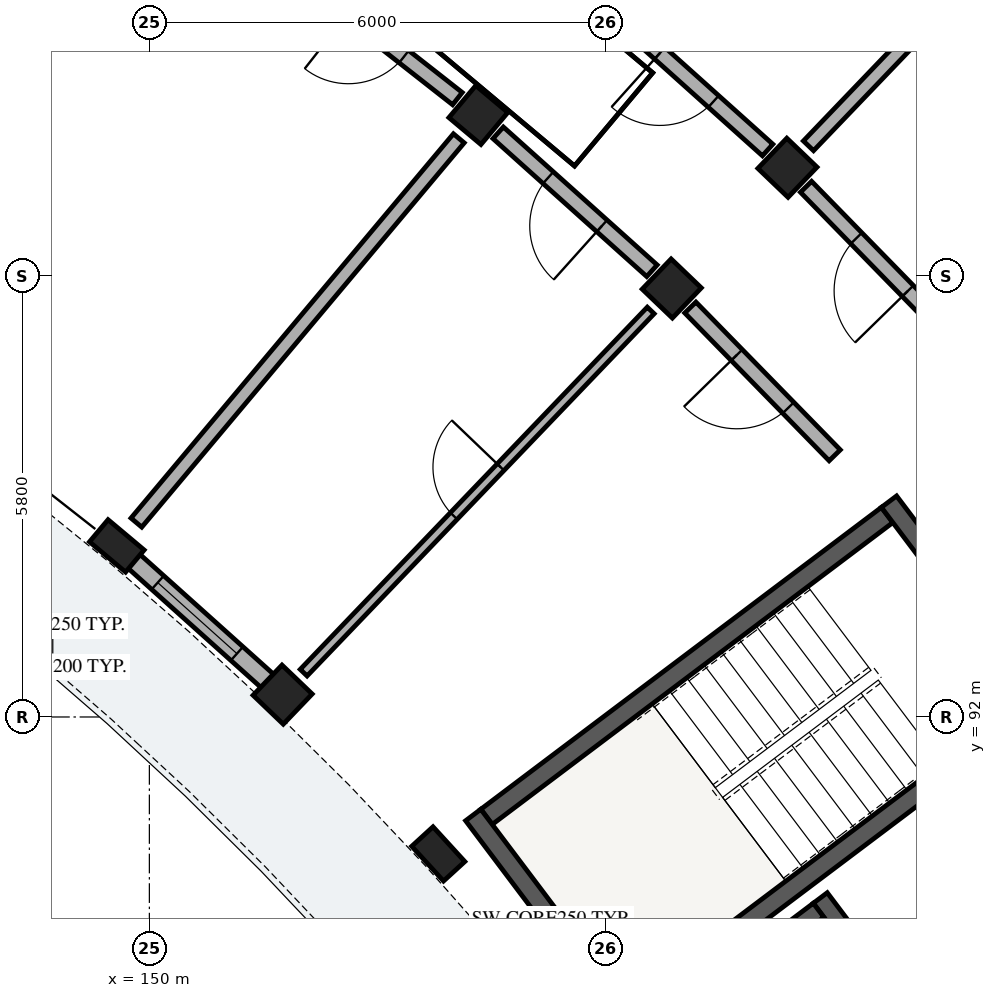
"""IFC4 building model, lengths in metres.
Left out: names, types, materials, properties, quantities, classifications, styles, units other than length and angle.
Written with IfcOpenShell. Run it as: python <this file> out.ifc"""

import sys

from ifc_helpers import new_model, si_unit, direction, frame, frame_2d, origin, origin_2d, place, context, subcontext, project, spatial, rectangle, extrude, element, fill, save


model = new_model("IFC4")
c1 = context("Model", 3, precision=1e-05, world=origin(), true_north=direction((0.0, 1.0)))
c2 = subcontext(c1, "Body", "Model", "MODEL_VIEW")
j1 = project(units=[si_unit("LENGTHUNIT", "METRE"), si_unit("PLANEANGLEUNIT", "RADIAN")], contexts=[c1])
p1 = place(None, origin())
s1 = spatial("IfcSite", under=j1, at=p1, CompositionType="ELEMENT")
p2 = place(p1, origin())
s2 = spatial("IfcBuilding", under=s1, at=p2, CompositionType="ELEMENT")
p3 = place(p2, frame((0.0, 0.0, 18.92)))
s3 = spatial("IfcBuildingStorey", under=s2, at=p3, CompositionType="ELEMENT", Elevation=18.92)
p4 = place(p3, frame((159.707, 94.658, 0.0), z_axis=(0.0, 0.0, 1.0), x_axis=(-0.798639633744, -0.601809550782, 0.0)))
e1 = element("IfcWall", 1, at=p4, inside=s3, PredefinedType="SHEAR", context=c2, shape_type="SweptSolid", body=[
    extrude(rectangle(XDim=6.6, YDim=0.25, at=frame_2d((3.3, 0.0))), origin(), (0.0, 0.0, 1.0), 3.11),
])
p5 = place(p3, frame((154.261, 90.711, 0.0), z_axis=(0.0, 0.0, 1.0), x_axis=(0.601825826579, -0.798627368967, 0.0)))
e2 = element("IfcWall", 2, at=p5, inside=s3, PredefinedType="SHEAR", context=c2, shape_type="SweptSolid", body=[
    extrude(rectangle(XDim=3.42, YDim=0.25, at=frame_2d((1.71, 0.0))), origin(), (0.0, 0.0, 1.0), 3.11),
])
p6 = place(p3, frame((159.731, 94.833, 0.0), z_axis=(0.0, 0.0, 1.0), x_axis=(0.601814606132, -0.798635824294, 0.0)))
e3 = element("IfcWall", 3, at=p6, inside=s3, PredefinedType="SHEAR", context=c2, shape_type="SweptSolid", body=[
    extrude(rectangle(XDim=3.42, YDim=0.25, at=frame_2d((1.71, 0.0))), origin(), (0.0, 0.0, 1.0), 3.11),
])
p7 = place(p3, frame((161.615, 92.126, 0.0), z_axis=(0.0, 0.0, 1.0), x_axis=(-0.798639633744, -0.601809550782, 0.0)))
e4 = element("IfcWall", 4, at=p7, inside=s3, PredefinedType="SHEAR", context=c2, shape_type="SweptSolid", body=[
    extrude(rectangle(XDim=6.6, YDim=0.25, at=frame_2d((3.3, 0.0))), origin(), (0.0, 0.0, 1.0), 3.11),
])
p8 = place(p7, frame((0.22, 0.0, 0.0)))
e5 = element("IfcOpeningElement", 5, at=p8, cuts=e4, PredefinedType="OPENING", context=c2, shape_type="SweptSolid", body=[
    extrude(rectangle(XDim=1.05, YDim=2.15, at=frame_2d((0.525, 1.075))), frame((0.0, 0.135, 0.0), z_axis=(0.0, -1.0, 0.0), x_axis=(1.0, 0.0, 0.0)), (0.0, 0.0, 1.0), 0.27),
])
p9 = place(p3, frame((158.827, 89.619, 0.0), z_axis=(0.0, 0.0, 1.0), x_axis=(0.601819781152, -0.798631924615, 0.0)))
e6 = element("IfcWall", 6, at=p9, inside=s3, PredefinedType="SHEAR", context=c2, shape_type="SweptSolid", body=[
    extrude(rectangle(XDim=3.26, YDim=0.23, at=frame_2d((1.63, 0.0))), origin(), (0.0, 0.0, 1.0), 3.11),
])
p10 = place(p9, frame((0.9, 0.0, 0.0)))
e7 = element("IfcOpeningElement", 7, at=p10, cuts=e6, PredefinedType="OPENING", context=c2, shape_type="SweptSolid", body=[
    extrude(rectangle(XDim=1.1, YDim=2.15, at=frame_2d((0.55, 1.075))), frame((0.0, 0.125, 0.0), z_axis=(0.0, -1.0, 0.0), x_axis=(1.0, 0.0, 0.0)), (0.0, 0.0, 1.0), 0.25),
])
p11 = place(p3, frame((158.805, 89.458, 0.0), z_axis=(0.0, 0.0, 1.0), x_axis=(-0.798608971494, -0.601850239387, 0.0)))
e8 = element("IfcWall", 8, at=p11, inside=s3, PredefinedType="SHEAR", context=c2, shape_type="SweptSolid", body=[
    extrude(rectangle(XDim=2.7, YDim=0.23, at=frame_2d((1.35, 0.0))), origin(), (0.0, 0.0, 1.0), 3.11),
])
p12 = place(p3, frame((153.801, 90.198, 0.0), z_axis=(0.0, 0.0, 1.0), x_axis=(0.73793204255, 0.674875025896, 0.0)))
e9 = element("IfcColumn", 9, at=p12, inside=s3, PredefinedType="PILASTER", context=c2, shape_type="SweptSolid", body=[
    extrude(rectangle(XDim=0.38, YDim=0.62, at=origin_2d()), origin(), (0.0, 0.0, 1.0), 3.11),
])
for number, where, z_axis, x_axis in (
    (10, (151.753, 92.294, 0.0), (0.0, 0.0, 1.0), (0.692, 0.722, 0.0)),
    (11, (156.873, 97.637, 0.0), (0.0, 0.0, 1.0), (0.692, 0.722, 0.0)),
    (12, (158.395, 99.226, 0.0), (0.0, 0.0, 1.0), (0.692, 0.722, 0.0)),
):
    element("IfcColumn", number, at=place(p3, frame(where, z_axis=z_axis, x_axis=x_axis)), inside=s3, PredefinedType="COLUMN", context=c2, shape_type="SweptSolid", body=[
        extrude(rectangle(XDim=0.55, YDim=0.55, at=origin_2d()), origin(), (0.0, 0.0, 1.0), 3.11),
    ])
p13 = place(p3, frame((149.572, 94.251, 0.0), z_axis=(0.0, 0.0, 1.0), x_axis=(0.642787582947, 0.766044465556, 0.0)))
e13 = element("IfcColumn", 13, at=p13, inside=s3, PredefinedType="PILASTER", context=c2, shape_type="SweptSolid", body=[
    extrude(rectangle(XDim=0.38, YDim=0.62, at=origin_2d()), origin(), (0.0, 0.0, 1.0), 3.11),
])
p14 = place(p3, frame((154.329, 99.919, 0.0), z_axis=(0.0, 0.0, 1.0), x_axis=(0.642787582947, 0.766044465556, 0.0)))
e14 = element("IfcColumn", 14, at=p14, inside=s3, PredefinedType="COLUMN", context=c2, shape_type="SweptSolid", body=[
    extrude(rectangle(XDim=0.55, YDim=0.55, at=origin_2d()), origin(), (0.0, 0.0, 1.0), 3.11),
])
p15 = place(p3, frame((151.571, 92.458, 0.0), z_axis=(0.0, 0.0, 1.0), x_axis=(-0.744489903584, 0.667633719536, 0.0)))
e15 = element("IfcWall", 15, at=p15, inside=s3, PredefinedType="SOLIDWALL", context=c2, shape_type="SweptSolid", body=[
    extrude(rectangle(XDim=2.525, YDim=0.24, at=frame_2d((1.263, 0.0))), origin(), (0.0, 0.0, 1.0), 2.355),
])
p16 = place(p15, frame((0.562, 0.0, 0.35)))
e16 = element("IfcOpeningElement", 16, at=p16, cuts=e15, PredefinedType="OPENING", context=c2, shape_type="SweptSolid", body=[
    extrude(rectangle(XDim=1.4, YDim=1.65, at=frame_2d((0.7, 0.825))), frame((0.0, 0.13, 0.0), z_axis=(0.0, -1.0, 0.0), x_axis=(1.0, 0.0, 0.0)), (0.0, 0.0, 1.0), 0.26),
])
p17 = place(p3, frame((160.641, 96.927, 0.0), z_axis=(0.0, 0.0, 1.0), x_axis=(-0.698787219683, 0.715329589496, 0.0)))
e17 = element("IfcWall", 17, at=p17, inside=s3, PredefinedType="PARTITIONING", context=c2, shape_type="SweptSolid", body=[
    extrude(rectangle(XDim=2.863, YDim=0.205, at=frame_2d((1.432, 0.0))), origin(), (0.0, 0.0, 1.0), 2.37),
])
p18 = place(p17, frame((0.947, 0.0, 0.0)))
e18 = element("IfcOpeningElement", 18, at=p18, cuts=e17, PredefinedType="OPENING", context=c2, shape_type="SweptSolid", body=[
    extrude(rectangle(XDim=0.97, YDim=2.15, at=frame_2d((0.485, 1.075))), frame((0.0, 0.113, 0.0), z_axis=(0.0, -1.0, 0.0), x_axis=(1.0, 0.0, 0.0)), (0.0, 0.0, 1.0), 0.225),
])
p19 = place(p3, frame((159.017, 95.443, 0.0), z_axis=(0.0, 0.0, 1.0), x_axis=(-0.698840007829, 0.715278018296, 0.0)))
e19 = element("IfcWall", 19, at=p19, inside=s3, PredefinedType="PARTITIONING", context=c2, shape_type="SweptSolid", body=[
    extrude(rectangle(XDim=2.718, YDim=0.205, at=frame_2d((1.359, 0.0))), origin(), (0.0, 0.0, 1.0), 2.37),
])
p20 = place(p19, frame((0.874, 0.0, 0.0)))
e20 = element("IfcOpeningElement", 20, at=p20, cuts=e19, PredefinedType="OPENING", context=c2, shape_type="SweptSolid", body=[
    extrude(rectangle(XDim=0.97, YDim=2.15, at=frame_2d((0.485, 1.075))), frame((0.0, 0.113, 0.0), z_axis=(0.0, -1.0, 0.0), x_axis=(1.0, 0.0, 0.0)), (0.0, 0.0, 1.0), 0.225),
])
p21 = place(p3, frame((158.672, 99.514, 0.0), z_axis=(0.0, 0.0, 1.0), x_axis=(0.691855720025, 0.722035776585, 0.0)))
e21 = element("IfcWall", 21, at=p21, inside=s3, PredefinedType="PARTITIONING", context=c2, shape_type="SweptSolid", body=[
    extrude(rectangle(XDim=4.7, YDim=0.185, at=frame_2d((2.35, 0.0))), origin(), (0.0, 0.0, 1.0), 2.37),
])
p22 = place(p3, frame((152.03, 92.583, 0.0), z_axis=(0.0, 0.0, 1.0), x_axis=(0.691872422458, 0.722019771919, 0.0)))
e22 = element("IfcWall", 22, at=p22, inside=s3, PredefinedType="PARTITIONING", context=c2, shape_type="SweptSolid", body=[
    extrude(rectangle(XDim=6.6, YDim=0.125, at=frame_2d((3.3, 0.0))), origin(), (0.0, 0.0, 1.0), 2.37),
])
p23 = place(p22, frame((2.855, 0.0, 0.0)))
e23 = element("IfcOpeningElement", 23, at=p23, cuts=e22, PredefinedType="OPENING", context=c2, shape_type="SweptSolid", body=[
    extrude(rectangle(XDim=0.89, YDim=2.1, at=frame_2d((0.445, 1.05))), frame((0.0, 0.073, 0.0), z_axis=(0.0, -1.0, 0.0), x_axis=(1.0, 0.0, 0.0)), (0.0, 0.0, 1.0), 0.145),
])
p24 = place(p3, frame((158.135, 99.459, 0.0), z_axis=(0.0, 0.0, 1.0), x_axis=(-0.744433521088, 0.667696587291, 0.0)))
e24 = element("IfcWall", 24, at=p24, inside=s3, PredefinedType="PARTITIONING", context=c2, shape_type="SweptSolid", body=[
    extrude(rectangle(XDim=2.863, YDim=0.205, at=frame_2d((1.432, 0.0))), origin(), (0.0, 0.0, 1.0), 2.37),
])
p25 = place(p24, frame((0.957, 0.0, 0.0)))
e25 = element("IfcOpeningElement", 25, at=p25, cuts=e24, PredefinedType="OPENING", context=c2, shape_type="SweptSolid", body=[
    extrude(rectangle(XDim=0.95, YDim=2.13, at=frame_2d((0.475, 1.065))), frame((0.0, 0.113, 0.0), z_axis=(0.0, -1.0, 0.0), x_axis=(1.0, 0.0, 0.0)), (0.0, 0.0, 1.0), 0.225),
])
p26 = place(p3, frame((156.613, 97.871, 0.0), z_axis=(0.0, 0.0, 1.0), x_axis=(-0.744418559135, 0.667713268413, 0.0)))
e26 = element("IfcWall", 26, at=p26, inside=s3, PredefinedType="PARTITIONING", context=c2, shape_type="SweptSolid", body=[
    extrude(rectangle(XDim=2.718, YDim=0.205, at=frame_2d((1.359, 0.0))), origin(), (0.0, 0.0, 1.0), 2.37),
])
p27 = place(p26, frame((0.884, 0.0, 0.0)))
e27 = element("IfcOpeningElement", 27, at=p27, cuts=e26, PredefinedType="OPENING", context=c2, shape_type="SweptSolid", body=[
    extrude(rectangle(XDim=0.95, YDim=2.13, at=frame_2d((0.475, 1.065))), frame((0.0, 0.113, 0.0), z_axis=(0.0, -1.0, 0.0), x_axis=(1.0, 0.0, 0.0)), (0.0, 0.0, 1.0), 0.225),
])
p28 = place(p3, frame((149.829, 94.557, 0.0), z_axis=(0.0, 0.0, 1.0), x_axis=(0.642789470807, 0.766042881449, 0.0)))
e28 = element("IfcWall", 28, at=p28, inside=s3, PredefinedType="PARTITIONING", context=c2, shape_type="SweptSolid", body=[
    extrude(rectangle(XDim=6.6, YDim=0.185, at=frame_2d((3.3, 0.0))), origin(), (0.0, 0.0, 1.0), 2.37),
])
p29 = place(p3, frame((154.053, 100.135, 0.0), z_axis=(0.0, 0.0, 1.0), x_axis=(-0.786835457019, 0.617162833924, 0.0)))
e29 = element("IfcWall", 29, at=p29, inside=s3, PredefinedType="PARTITIONING", context=c2, shape_type="SweptSolid", body=[
    extrude(rectangle(XDim=2.718, YDim=0.205, at=frame_2d((1.359, 0.0))), origin(), (0.0, 0.0, 1.0), 2.37),
])
p30 = place(p29, frame((0.894, 0.0, 0.0)))
e30 = element("IfcOpeningElement", 30, at=p30, cuts=e29, PredefinedType="OPENING", context=c2, shape_type="SweptSolid", body=[
    extrude(rectangle(XDim=0.93, YDim=2.12, at=frame_2d((0.465, 1.06))), frame((0.0, 0.113, 0.0), z_axis=(0.0, -1.0, 0.0), x_axis=(1.0, 0.0, 0.0)), (0.0, 0.0, 1.0), 0.225),
])
p31 = place(p16, origin())
e31 = element("IfcWindow", 31, at=p31, inside=s3, PartitioningType="SINGLE_PANEL", PredefinedType="WINDOW", context=c2, shape_type="SweptSolid", body=[
    extrude(rectangle(XDim=1.4, YDim=1.65, at=frame_2d((0.7, 0.825))), frame((0.0, 0.03, 0.0), z_axis=(0.0, -1.0, 0.0), x_axis=(1.0, 0.0, 0.0)), (0.0, 0.0, 1.0), 0.06),
])
fill(e16, e31)
p32 = place(p18, origin())
e32 = element("IfcDoor", 32, at=p32, inside=s3, OperationType="SINGLE_SWING_LEFT", PredefinedType="DOOR", context=c2, shape_type="SweptSolid", body=[
    extrude(rectangle(XDim=0.97, YDim=2.15, at=frame_2d((0.485, 1.075))), frame((0.0, 0.025, 0.0), z_axis=(0.0, -1.0, 0.0), x_axis=(1.0, 0.0, 0.0)), (0.0, 0.0, 1.0), 0.05),
])
fill(e18, e32)
p33 = place(p20, origin())
e33 = element("IfcDoor", 33, at=p33, inside=s3, OperationType="SINGLE_SWING_RIGHT", PredefinedType="DOOR", context=c2, shape_type="SweptSolid", body=[
    extrude(rectangle(XDim=0.97, YDim=2.15, at=frame_2d((0.485, 1.075))), frame((0.0, 0.025, 0.0), z_axis=(0.0, -1.0, 0.0), x_axis=(1.0, 0.0, 0.0)), (0.0, 0.0, 1.0), 0.05),
])
fill(e20, e33)
p34 = place(p23, origin())
e34 = element("IfcDoor", 34, at=p34, inside=s3, OperationType="SINGLE_SWING_RIGHT", PredefinedType="DOOR", context=c2, shape_type="SweptSolid", body=[
    extrude(rectangle(XDim=0.89, YDim=2.1, at=frame_2d((0.445, 1.05))), frame((0.0, 0.025, 0.0), z_axis=(0.0, -1.0, 0.0), x_axis=(1.0, 0.0, 0.0)), (0.0, 0.0, 1.0), 0.05),
])
fill(e23, e34)
p35 = place(p25, origin())
e35 = element("IfcDoor", 35, at=p35, inside=s3, OperationType="SINGLE_SWING_RIGHT", PredefinedType="DOOR", context=c2, shape_type="SweptSolid", body=[
    extrude(rectangle(XDim=0.95, YDim=2.13, at=frame_2d((0.475, 1.065))), frame((0.0, 0.025, 0.0), z_axis=(0.0, -1.0, 0.0), x_axis=(1.0, 0.0, 0.0)), (0.0, 0.0, 1.0), 0.05),
])
fill(e25, e35)
p36 = place(p27, origin())
e36 = element("IfcDoor", 36, at=p36, inside=s3, OperationType="SINGLE_SWING_LEFT", PredefinedType="DOOR", context=c2, shape_type="SweptSolid", body=[
    extrude(rectangle(XDim=0.95, YDim=2.13, at=frame_2d((0.475, 1.065))), frame((0.0, 0.025, 0.0), z_axis=(0.0, -1.0, 0.0), x_axis=(1.0, 0.0, 0.0)), (0.0, 0.0, 1.0), 0.05),
])
fill(e27, e36)
p37 = place(p30, origin())
e37 = element("IfcDoor", 37, at=p37, inside=s3, OperationType="SINGLE_SWING_RIGHT", PredefinedType="DOOR", context=c2, shape_type="SweptSolid", body=[
    extrude(rectangle(XDim=0.93, YDim=2.12, at=frame_2d((0.465, 1.06))), frame((0.0, 0.025, 0.0), z_axis=(0.0, -1.0, 0.0), x_axis=(1.0, 0.0, 0.0)), (0.0, 0.0, 1.0), 0.05),
])
fill(e30, e37)
save(model, sys.argv[1])
